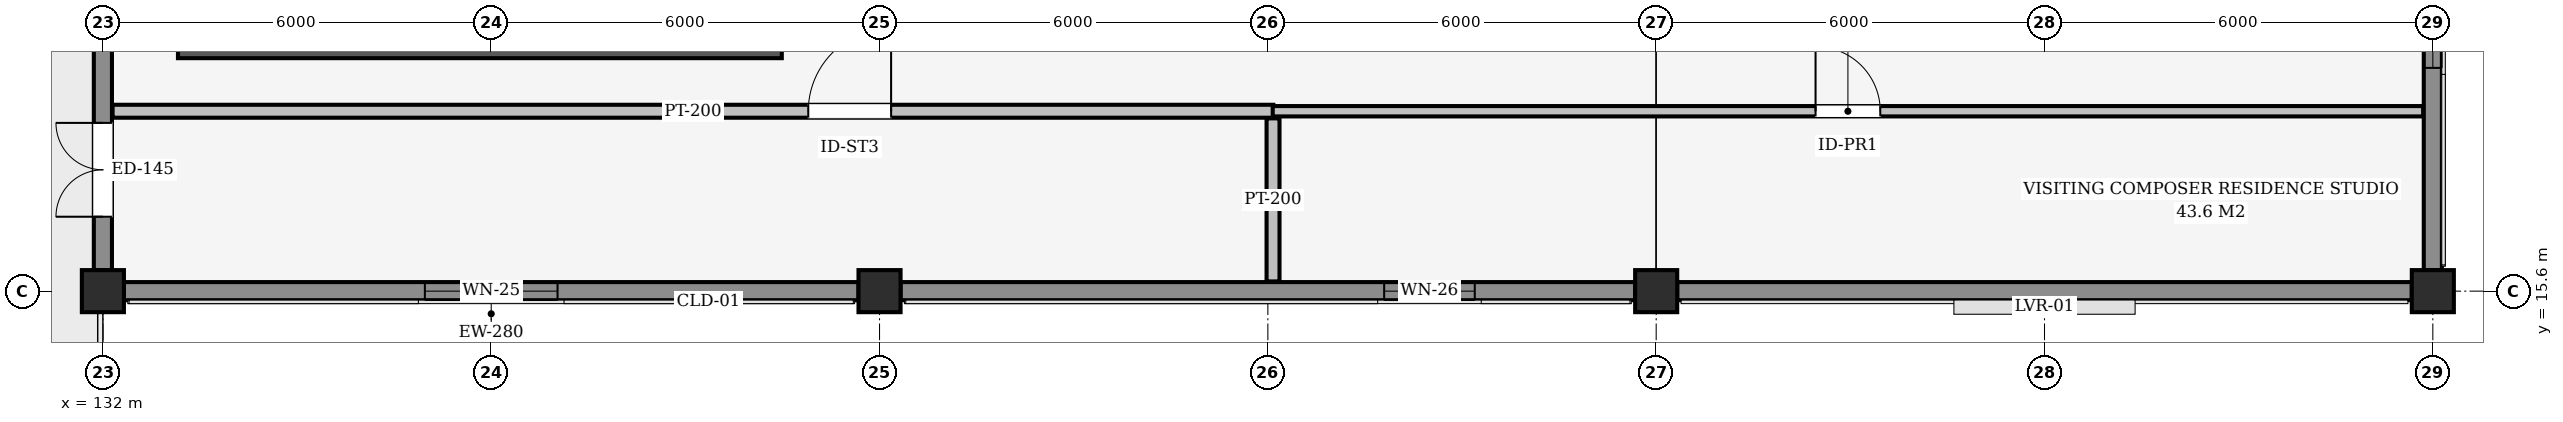
"""IFC4 building model, lengths in metres.
Left out: names, types, materials, properties, quantities, classifications, styles, units other than length and angle.
Written with IfcOpenShell. Run it as: python <this file> out.ifc"""

import sys

from ifc_helpers import new_model, si_unit, direction, frame, frame_2d, origin, origin_2d, place, context, subcontext, project, spatial, rectangle, extrude, element, fill, save


model = new_model("IFC4")
c1 = context("Model", 3, precision=1e-05, world=origin(), true_north=direction((0.0, 1.0)))
c2 = subcontext(c1, "Body", "Model", "MODEL_VIEW")
j1 = project(units=[si_unit("LENGTHUNIT", "METRE"), si_unit("PLANEANGLEUNIT", "RADIAN")], contexts=[c1])
p1 = place(None, origin())
s1 = spatial("IfcSite", under=j1, at=p1, CompositionType="ELEMENT")
p2 = place(p1, origin())
s2 = spatial("IfcBuilding", under=s1, at=p2, CompositionType="ELEMENT")
p3 = place(p2, frame((0.0, 0.0, 18.3)))
s3 = spatial("IfcBuildingStorey", under=s2, at=p3, CompositionType="ELEMENT", Elevation=18.3)
for number, where, z_axis, x_axis in (
    (1, (132.0, 15.6, 0.0), (0.0, 0.0, 1.0), (1.0, 0.0, 0.0)),
    (2, (144.0, 15.6, 0.0), (0.0, 0.0, 1.0), (1.0, 0.0, 0.0)),
    (3, (156.0, 15.6, 0.0), (0.0, 0.0, 1.0), (1.0, 0.0, 0.0)),
    (4, (168.0, 15.6, 0.0), (0.0, 0.0, 1.0), (1.0, 0.0, 0.0)),
):
    element("IfcColumn", number, at=place(p3, frame(where, z_axis=z_axis, x_axis=x_axis)), inside=s3, PredefinedType="COLUMN", context=c2, shape_type="SweptSolid", body=[
        extrude(rectangle(XDim=0.65, YDim=0.65, at=origin_2d()), origin(), (0.0, 0.0, 1.0), 3.9),
    ])
p4 = place(p3, frame((143.675, 15.6, 0.0), z_axis=(0.0, 0.0, 1.0), x_axis=(-1.0, 0.0, 0.0)))
e5 = element("IfcWall", 5, at=p4, inside=s3, PredefinedType="SOLIDWALL", context=c2, shape_type="SweptSolid", body=[
    extrude(rectangle(XDim=11.35, YDim=0.28, at=frame_2d((5.675, 0.0))), origin(), (0.0, 0.0, 1.0), 3.269),
])
p5 = place(p4, frame((4.65, 0.0, 0.85)))
e6 = element("IfcOpeningElement", 6, at=p5, cuts=e5, PredefinedType="OPENING", context=c2, shape_type="SweptSolid", body=[
    extrude(rectangle(XDim=2.05, YDim=1.5, at=frame_2d((1.025, 0.75))), frame((0.0, 0.15, 0.0), z_axis=(0.0, -1.0, 0.0), x_axis=(1.0, 0.0, 0.0)), (0.0, 0.0, 1.0), 0.3),
])
p6 = place(p3, frame((155.675, 15.6, 0.0), z_axis=(0.0, 0.0, 1.0), x_axis=(-1.0, 0.0, 0.0)))
e7 = element("IfcWall", 7, at=p6, inside=s3, PredefinedType="SOLIDWALL", context=c2, shape_type="SweptSolid", body=[
    extrude(rectangle(XDim=11.35, YDim=0.28, at=frame_2d((5.675, 0.0))), origin(), (0.0, 0.0, 1.0), 3.269),
])
p7 = place(p6, frame((2.478, 0.0, 0.85)))
e8 = element("IfcOpeningElement", 8, at=p7, cuts=e7, PredefinedType="OPENING", context=c2, shape_type="SweptSolid", body=[
    extrude(rectangle(XDim=1.4, YDim=1.3, at=frame_2d((0.7, 0.65))), frame((0.0, 0.15, 0.0), z_axis=(0.0, -1.0, 0.0), x_axis=(1.0, 0.0, 0.0)), (0.0, 0.0, 1.0), 0.3),
])
p8 = place(p3, frame((167.675, 15.6, 0.0), z_axis=(0.0, 0.0, 1.0), x_axis=(-1.0, 0.0, 0.0)))
e9 = element("IfcWall", 9, at=p8, inside=s3, PredefinedType="SOLIDWALL", context=c2, shape_type="SweptSolid", body=[
    extrude(rectangle(XDim=11.35, YDim=0.28, at=frame_2d((5.675, 0.0))), origin(), (0.0, 0.0, 1.0), 3.269),
])
p9 = place(p3, frame((168.0, 23.675, 0.0), z_axis=(0.0, 0.0, 1.0), x_axis=(0.0, -1.0, 0.0)))
e10 = element("IfcWall", 10, at=p9, inside=s3, PredefinedType="SOLIDWALL", context=c2, shape_type="SweptSolid", body=[
    extrude(rectangle(XDim=7.75, YDim=0.28, at=frame_2d((3.875, 0.0))), origin(), (0.0, 0.0, 1.0), 3.268),
])
p10 = place(p9, frame((3.125, 0.0, 0.85)))
e11 = element("IfcOpeningElement", 11, at=p10, cuts=e10, PredefinedType="OPENING", context=c2, shape_type="SweptSolid", body=[
    extrude(rectangle(XDim=1.5, YDim=1.65, at=frame_2d((0.75, 0.825))), frame((0.0, 0.15, 0.0), z_axis=(0.0, -1.0, 0.0), x_axis=(1.0, 0.0, 0.0)), (0.0, 0.0, 1.0), 0.3),
])
p11 = place(p3, frame((132.0, 15.925, 0.0), z_axis=(0.0, 0.0, 1.0), x_axis=(0.0, 1.0, 0.0)))
e12 = element("IfcWall", 12, at=p11, inside=s3, PredefinedType="SOLIDWALL", context=c2, shape_type="SweptSolid", body=[
    extrude(rectangle(XDim=7.75, YDim=0.28, at=frame_2d((3.875, 0.0))), origin(), (0.0, 0.0, 1.0), 3.268),
])
p12 = place(p11, frame((0.825, 0.0, 0.0)))
e13 = element("IfcOpeningElement", 13, at=p12, cuts=e12, PredefinedType="OPENING", context=c2, shape_type="SweptSolid", body=[
    extrude(rectangle(XDim=1.45, YDim=2.25, at=frame_2d((0.725, 1.125))), frame((0.0, 0.15, 0.0), z_axis=(0.0, -1.0, 0.0), x_axis=(1.0, 0.0, 0.0)), (0.0, 0.0, 1.0), 0.3),
])
p13 = place(p3, frame((133.16, 19.345, 0.0), z_axis=(0.0, 0.0, 1.0), x_axis=(1.0, 0.0, 0.0)))
e14 = element("IfcWall", 14, at=p13, inside=s3, PredefinedType="SHEAR", context=c2, shape_type="SweptSolid", body=[
    extrude(rectangle(XDim=9.33, YDim=0.29, at=frame_2d((4.665, 0.0))), origin(), (0.0, 0.0, 1.0), 3.9),
])
p14 = place(p3, frame((132.15, 18.38, 0.0), z_axis=(0.0, 0.0, 1.0), x_axis=(1.0, 0.0, 0.0)))
e15 = element("IfcWall", 15, at=p14, inside=s3, PredefinedType="PARTITIONING", context=c2, shape_type="SweptSolid", body=[
    extrude(rectangle(XDim=17.935, YDim=0.2, at=frame_2d((8.968, 0.0))), origin(), (0.0, 0.0, 1.0), 3.9),
])
p15 = place(p14, frame((10.749, 0.0, 0.0)))
e16 = element("IfcOpeningElement", 16, at=p15, cuts=e15, PredefinedType="OPENING", context=c2, shape_type="SweptSolid", body=[
    extrude(rectangle(XDim=1.28, YDim=2.26, at=frame_2d((0.64, 1.13))), frame((0.0, 0.11, 0.0), z_axis=(0.0, -1.0, 0.0), x_axis=(1.0, 0.0, 0.0)), (0.0, 0.0, 1.0), 0.22),
])
p16 = place(p3, frame((150.075, 18.38, 0.0), z_axis=(0.0, 0.0, 1.0), x_axis=(1.0, 0.0, 0.0)))
e17 = element("IfcWall", 17, at=p16, inside=s3, PredefinedType="PARTITIONING", context=c2, shape_type="SweptSolid", body=[
    extrude(rectangle(XDim=17.775, YDim=0.16, at=frame_2d((8.888, 0.0))), origin(), (0.0, 0.0, 1.0), 3.9),
])
p17 = place(p16, frame((8.387, 0.0, 0.0)))
e18 = element("IfcOpeningElement", 18, at=p17, cuts=e17, PredefinedType="OPENING", context=c2, shape_type="SweptSolid", body=[
    extrude(rectangle(XDim=1.0, YDim=2.16, at=frame_2d((0.5, 1.08))), frame((0.0, 0.09, 0.0), z_axis=(0.0, -1.0, 0.0), x_axis=(1.0, 0.0, 0.0)), (0.0, 0.0, 1.0), 0.18),
])
p18 = place(p3, frame((150.08, 15.75, 0.0), z_axis=(0.0, 0.0, 1.0), x_axis=(0.0, 1.0, 0.0)))
e19 = element("IfcWall", 19, at=p18, inside=s3, PredefinedType="PARTITIONING", context=c2, shape_type="SweptSolid", body=[
    extrude(rectangle(XDim=2.52, YDim=0.2, at=frame_2d((1.26, 0.0))), origin(), (0.0, 0.0, 1.0), 3.9),
])
p19 = place(p5, origin())
e20 = element("IfcWindow", 20, at=p19, inside=s3, PartitioningType="SINGLE_PANEL", PredefinedType="WINDOW", context=c2, shape_type="SweptSolid", body=[
    extrude(rectangle(XDim=2.05, YDim=1.5, at=frame_2d((1.025, 0.75))), frame((0.0, 0.03, 0.0), z_axis=(0.0, -1.0, 0.0), x_axis=(1.0, 0.0, 0.0)), (0.0, 0.0, 1.0), 0.06),
])
fill(e6, e20)
p20 = place(p7, origin())
e21 = element("IfcWindow", 21, at=p20, inside=s3, PartitioningType="SINGLE_PANEL", PredefinedType="WINDOW", context=c2, shape_type="SweptSolid", body=[
    extrude(rectangle(XDim=1.4, YDim=1.3, at=frame_2d((0.7, 0.65))), frame((0.0, 0.03, 0.0), z_axis=(0.0, -1.0, 0.0), x_axis=(1.0, 0.0, 0.0)), (0.0, 0.0, 1.0), 0.06),
])
fill(e8, e21)
p21 = place(p10, origin())
e22 = element("IfcWindow", 22, at=p21, inside=s3, PartitioningType="SINGLE_PANEL", PredefinedType="WINDOW", context=c2, shape_type="SweptSolid", body=[
    extrude(rectangle(XDim=1.5, YDim=1.65, at=frame_2d((0.75, 0.825))), frame((0.0, 0.03, 0.0), z_axis=(0.0, -1.0, 0.0), x_axis=(1.0, 0.0, 0.0)), (0.0, 0.0, 1.0), 0.06),
])
fill(e11, e22)
p22 = place(p12, origin())
e23 = element("IfcDoor", 23, at=p22, inside=s3, OperationType="DOUBLE_DOOR_SINGLE_SWING", PredefinedType="DOOR", context=c2, shape_type="SweptSolid", body=[
    extrude(rectangle(XDim=1.45, YDim=2.25, at=frame_2d((0.725, 1.125))), frame((0.0, 0.025, 0.0), z_axis=(0.0, -1.0, 0.0), x_axis=(1.0, 0.0, 0.0)), (0.0, 0.0, 1.0), 0.05),
])
fill(e13, e23)
p23 = place(p15, origin())
e24 = element("IfcDoor", 24, at=p23, inside=s3, OperationType="SINGLE_SWING_RIGHT", PredefinedType="DOOR", context=c2, shape_type="SweptSolid", body=[
    extrude(rectangle(XDim=1.28, YDim=2.26, at=frame_2d((0.64, 1.13))), frame((0.0, 0.025, 0.0), z_axis=(0.0, -1.0, 0.0), x_axis=(1.0, 0.0, 0.0)), (0.0, 0.0, 1.0), 0.05),
])
fill(e16, e24)
p24 = place(p17, origin())
e25 = element("IfcDoor", 25, at=p24, inside=s3, OperationType="SINGLE_SWING_LEFT", PredefinedType="DOOR", context=c2, shape_type="SweptSolid", body=[
    extrude(rectangle(XDim=1.0, YDim=2.16, at=frame_2d((0.5, 1.08))), frame((0.0, 0.025, 0.0), z_axis=(0.0, -1.0, 0.0), x_axis=(1.0, 0.0, 0.0)), (0.0, 0.0, 1.0), 0.05),
])
fill(e18, e25)
save(model, sys.argv[1])
